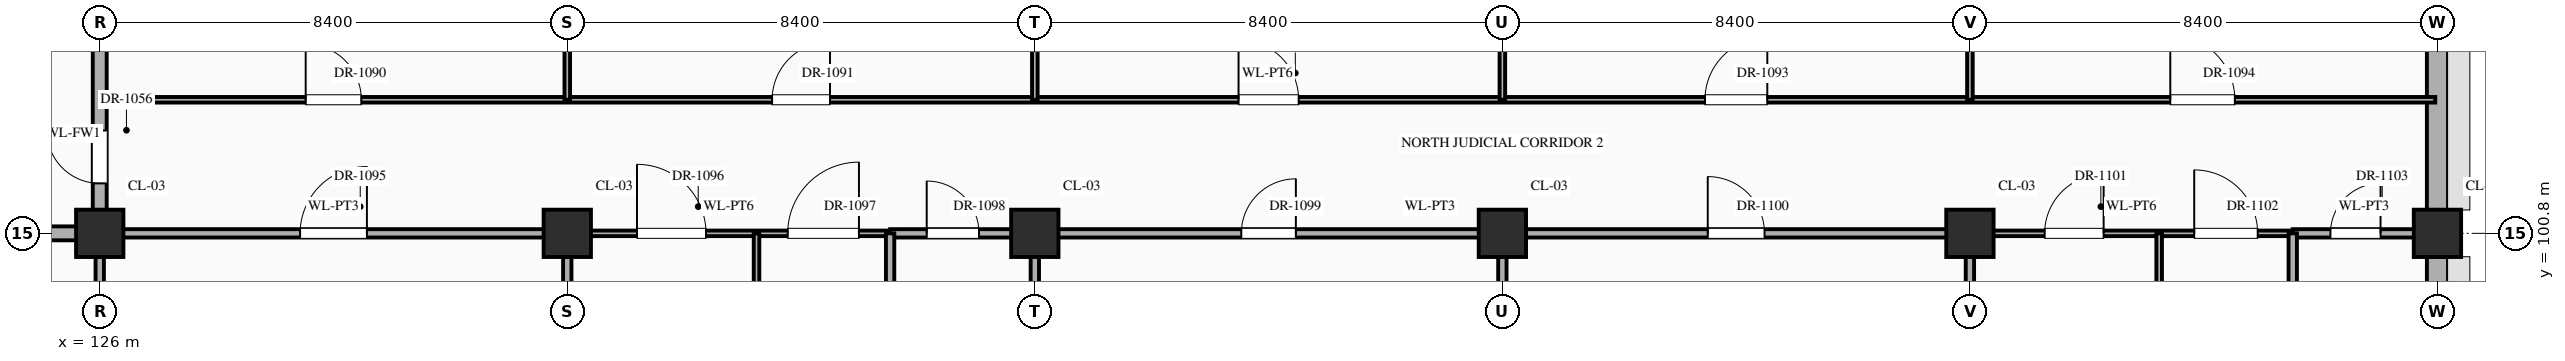
"""IFC4 building model, lengths in metres.
Left out: names, types, materials, properties, quantities, classifications, styles, units other than length and angle.
Written with IfcOpenShell. Run it as: python <this file> out.ifc"""

import sys

from ifc_helpers import new_model, si_unit, direction, frame, frame_2d, origin, origin_2d, place, context, subcontext, project, spatial, rectangle, extrude, element, fill, save


model = new_model("IFC4")
c1 = context("Model", 3, precision=1e-05, world=origin(), true_north=direction((0.0, 1.0)))
c2 = subcontext(c1, "Body", "Model", "MODEL_VIEW")
j1 = project(units=[si_unit("LENGTHUNIT", "METRE"), si_unit("PLANEANGLEUNIT", "RADIAN")], contexts=[c1])
p1 = place(None, origin())
s1 = spatial("IfcSite", under=j1, at=p1, CompositionType="ELEMENT")
p2 = place(p1, origin())
s2 = spatial("IfcBuilding", under=s1, at=p2, CompositionType="ELEMENT")
p3 = place(p2, frame((0.0, 0.0, 5.4)))
s3 = spatial("IfcBuildingStorey", under=s2, at=p3, CompositionType="ELEMENT", Elevation=5.4)
for number, where, z_axis, x_axis in (
    (1, (126.0, 100.8, 0.0), (0.0, 0.0, 1.0), (1.0, 0.0, 0.0)),
    (2, (134.4, 100.8, 0.0), (0.0, 0.0, 1.0), (1.0, 0.0, 0.0)),
    (3, (142.8, 100.8, 0.0), (0.0, 0.0, 1.0), (1.0, 0.0, 0.0)),
    (4, (151.2, 100.8, 0.0), (0.0, 0.0, 1.0), (1.0, 0.0, 0.0)),
    (5, (159.6, 100.8, 0.0), (0.0, 0.0, 1.0), (1.0, 0.0, 0.0)),
    (6, (168.0, 100.8, 0.0), (0.0, 0.0, 1.0), (1.0, 0.0, 0.0)),
):
    element("IfcColumn", number, at=place(p3, frame(where, z_axis=z_axis, x_axis=x_axis)), inside=s3, PredefinedType="COLUMN", context=c2, shape_type="SweptSolid", body=[
        extrude(rectangle(XDim=0.85, YDim=0.85, at=origin_2d()), origin(), (0.0, 0.0, 1.0), 5.4),
    ])
p4 = place(p3, frame((168.0, 94.02, 0.0), z_axis=(0.0, 0.0, 1.0), x_axis=(0.0, 1.0, 0.0)))
e7 = element("IfcWall", 7, at=p4, inside=s3, PredefinedType="STANDARD", context=c2, shape_type="SweptSolid", body=[
    extrude(rectangle(XDim=6.36, YDim=0.38, at=frame_2d((3.18, 0.0))), origin(), (0.0, 0.0, 1.0), 4.47),
])
p5 = place(p4, frame((3.88, 0.0, 0.85)))
e8 = element("IfcOpeningElement", 8, at=p5, cuts=e7, PredefinedType="OPENING", context=c2, shape_type="SweptSolid", body=[
    extrude(rectangle(XDim=1.2, YDim=1.38, at=frame_2d((0.6, 0.69))), frame((0.0, 0.202, 0.0), z_axis=(0.0, -1.0, 0.0), x_axis=(1.0, 0.0, 0.0)), (0.0, 0.0, 1.0), 0.404),
])
p6 = place(p3, frame((168.0, 101.22, 0.0), z_axis=(0.0, 0.0, 1.0), x_axis=(0.0, 1.0, 0.0)))
e9 = element("IfcWall", 9, at=p6, inside=s3, PredefinedType="STANDARD", context=c2, shape_type="SweptSolid", body=[
    extrude(rectangle(XDim=6.36, YDim=0.38, at=frame_2d((3.18, 0.0))), origin(), (0.0, 0.0, 1.0), 4.47),
])
p7 = place(p6, frame((3.88, 0.0, 0.85)))
e10 = element("IfcOpeningElement", 10, at=p7, cuts=e9, PredefinedType="OPENING", context=c2, shape_type="SweptSolid", body=[
    extrude(rectangle(XDim=1.2, YDim=1.56, at=frame_2d((0.6, 0.78))), frame((0.0, 0.202, 0.0), z_axis=(0.0, -1.0, 0.0), x_axis=(1.0, 0.0, 0.0)), (0.0, 0.0, 1.0), 0.404),
])
p8 = place(p3, frame((121.8, 100.8, 0.0), z_axis=(0.0, 0.0, 1.0), x_axis=(1.0, 0.0, 0.0)))
e11 = element("IfcWall", 11, at=p8, inside=s3, PredefinedType="STANDARD", context=c2, shape_type="SweptSolid", body=[
    extrude(rectangle(XDim=4.2, YDim=0.25, at=frame_2d((2.1, 0.0))), origin(), (0.0, 0.0, 1.0), 4.27),
])
p9 = place(p3, frame((126.0, 100.8, 0.0), z_axis=(0.0, 0.0, 1.0), x_axis=(1.0, 0.0, 0.0)))
e12 = element("IfcWall", 12, at=p9, inside=s3, PredefinedType="STANDARD", context=c2, shape_type="SweptSolid", body=[
    extrude(rectangle(XDim=8.4, YDim=0.15, at=frame_2d((4.2, 0.0))), origin(), (0.0, 0.0, 1.0), 4.27),
])
p10 = place(p9, frame((3.6, 0.0, 0.0)))
e13 = element("IfcOpeningElement", 13, at=p10, cuts=e12, PredefinedType="OPENING", context=c2, shape_type="SweptSolid", body=[
    extrude(rectangle(XDim=1.2, YDim=2.35, at=frame_2d((0.6, 1.175))), frame((0.0, 0.087, 0.0), z_axis=(0.0, -1.0, 0.0), x_axis=(1.0, 0.0, 0.0)), (0.0, 0.0, 1.0), 0.174),
])
p11 = place(p3, frame((134.4, 100.8, 0.0), z_axis=(0.0, 0.0, 1.0), x_axis=(1.0, 0.0, 0.0)))
e14 = element("IfcWall", 14, at=p11, inside=s3, PredefinedType="STANDARD", context=c2, shape_type="SweptSolid", body=[
    extrude(rectangle(XDim=5.8, YDim=0.1, at=frame_2d((2.9, 0.0))), origin(), (0.0, 0.0, 1.0), 4.27),
])
p12 = place(p11, frame((1.252, 0.0, 0.0)))
e15 = element("IfcOpeningElement", 15, at=p12, cuts=e14, PredefinedType="OPENING", context=c2, shape_type="SweptSolid", body=[
    extrude(rectangle(XDim=1.24, YDim=2.3, at=frame_2d((0.62, 1.15))), frame((0.0, 0.062, 0.0), z_axis=(0.0, -1.0, 0.0), x_axis=(1.0, 0.0, 0.0)), (0.0, 0.0, 1.0), 0.124),
])
p13 = place(p11, frame((3.96, 0.0, 0.0)))
e16 = element("IfcOpeningElement", 16, at=p13, cuts=e14, PredefinedType="OPENING", context=c2, shape_type="SweptSolid", body=[
    extrude(rectangle(XDim=1.28, YDim=2.35, at=frame_2d((0.64, 1.175))), frame((0.0, 0.062, 0.0), z_axis=(0.0, -1.0, 0.0), x_axis=(1.0, 0.0, 0.0)), (0.0, 0.0, 1.0), 0.124),
])
p14 = place(p3, frame((140.2, 100.8, 0.0), z_axis=(0.0, 0.0, 1.0), x_axis=(1.0, 0.0, 0.0)))
e17 = element("IfcWall", 17, at=p14, inside=s3, PredefinedType="STANDARD", context=c2, shape_type="SweptSolid", body=[
    extrude(rectangle(XDim=19.4, YDim=0.15, at=frame_2d((9.7, 0.0))), origin(), (0.0, 0.0, 1.0), 4.27),
])
p15 = place(p14, frame((0.657, 0.0, 0.0)))
e18 = element("IfcOpeningElement", 18, at=p15, cuts=e17, PredefinedType="OPENING", context=c2, shape_type="SweptSolid", body=[
    extrude(rectangle(XDim=0.94, YDim=2.3, at=frame_2d((0.47, 1.15))), frame((0.0, 0.087, 0.0), z_axis=(0.0, -1.0, 0.0), x_axis=(1.0, 0.0, 0.0)), (0.0, 0.0, 1.0), 0.174),
])
p16 = place(p14, frame((6.31, 0.0, 0.0)))
e19 = element("IfcOpeningElement", 19, at=p16, cuts=e17, PredefinedType="OPENING", context=c2, shape_type="SweptSolid", body=[
    extrude(rectangle(XDim=0.98, YDim=2.35, at=frame_2d((0.49, 1.175))), frame((0.0, 0.087, 0.0), z_axis=(0.0, -1.0, 0.0), x_axis=(1.0, 0.0, 0.0)), (0.0, 0.0, 1.0), 0.174),
])
p17 = place(p14, frame((14.69, 0.0, 0.0)))
e20 = element("IfcOpeningElement", 20, at=p17, cuts=e17, PredefinedType="OPENING", context=c2, shape_type="SweptSolid", body=[
    extrude(rectangle(XDim=1.02, YDim=2.4, at=frame_2d((0.51, 1.2))), frame((0.0, 0.087, 0.0), z_axis=(0.0, -1.0, 0.0), x_axis=(1.0, 0.0, 0.0)), (0.0, 0.0, 1.0), 0.174),
])
p18 = place(p3, frame((159.6, 100.8, 0.0), z_axis=(0.0, 0.0, 1.0), x_axis=(1.0, 0.0, 0.0)))
e21 = element("IfcWall", 21, at=p18, inside=s3, PredefinedType="STANDARD", context=c2, shape_type="SweptSolid", body=[
    extrude(rectangle(XDim=5.8, YDim=0.1, at=frame_2d((2.9, 0.0))), origin(), (0.0, 0.0, 1.0), 4.27),
])
p19 = place(p18, frame((1.343, 0.0, 0.0)))
e22 = element("IfcOpeningElement", 22, at=p19, cuts=e21, PredefinedType="OPENING", context=c2, shape_type="SweptSolid", body=[
    extrude(rectangle(XDim=1.06, YDim=2.4, at=frame_2d((0.53, 1.2))), frame((0.0, 0.062, 0.0), z_axis=(0.0, -1.0, 0.0), x_axis=(1.0, 0.0, 0.0)), (0.0, 0.0, 1.0), 0.124),
])
p20 = place(p18, frame((4.03, 0.0, 0.0)))
e23 = element("IfcOpeningElement", 23, at=p20, cuts=e21, PredefinedType="OPENING", context=c2, shape_type="SweptSolid", body=[
    extrude(rectangle(XDim=1.14, YDim=2.4, at=frame_2d((0.57, 1.2))), frame((0.0, 0.062, 0.0), z_axis=(0.0, -1.0, 0.0), x_axis=(1.0, 0.0, 0.0)), (0.0, 0.0, 1.0), 0.124),
])
p21 = place(p3, frame((165.4, 100.8, 0.0), z_axis=(0.0, 0.0, 1.0), x_axis=(1.0, 0.0, 0.0)))
e24 = element("IfcWall", 24, at=p21, inside=s3, PredefinedType="STANDARD", context=c2, shape_type="SweptSolid", body=[
    extrude(rectangle(XDim=2.56, YDim=0.15, at=frame_2d((1.28, 0.0))), origin(), (0.0, 0.0, 1.0), 4.27),
])
p22 = place(p21, frame((0.677, 0.0, 0.0)))
e25 = element("IfcOpeningElement", 25, at=p22, cuts=e24, PredefinedType="OPENING", context=c2, shape_type="SweptSolid", body=[
    extrude(rectangle(XDim=0.9, YDim=2.15, at=frame_2d((0.45, 1.075))), frame((0.0, 0.087, 0.0), z_axis=(0.0, -1.0, 0.0), x_axis=(1.0, 0.0, 0.0)), (0.0, 0.0, 1.0), 0.174),
])
p23 = place(p3, frame((126.0, 103.2, 0.0), z_axis=(0.0, 0.0, 1.0), x_axis=(1.0, 0.0, 0.0)))
e26 = element("IfcWall", 26, at=p23, inside=s3, PredefinedType="STANDARD", context=c2, shape_type="SweptSolid", body=[
    extrude(rectangle(XDim=41.96, YDim=0.1, at=frame_2d((20.98, 0.0))), origin(), (0.0, 0.0, 1.0), 5.12),
])
p24 = place(p23, frame((3.7, 0.0, 0.0)))
e27 = element("IfcOpeningElement", 27, at=p24, cuts=e26, PredefinedType="OPENING", context=c2, shape_type="SweptSolid", body=[
    extrude(rectangle(XDim=1.0, YDim=2.25, at=frame_2d((0.5, 1.125))), frame((0.0, 0.062, 0.0), z_axis=(0.0, -1.0, 0.0), x_axis=(1.0, 0.0, 0.0)), (0.0, 0.0, 1.0), 0.124),
])
p25 = place(p23, frame((12.08, 0.0, 0.0)))
e28 = element("IfcOpeningElement", 28, at=p25, cuts=e26, PredefinedType="OPENING", context=c2, shape_type="SweptSolid", body=[
    extrude(rectangle(XDim=1.04, YDim=2.2, at=frame_2d((0.52, 1.1))), frame((0.0, 0.062, 0.0), z_axis=(0.0, -1.0, 0.0), x_axis=(1.0, 0.0, 0.0)), (0.0, 0.0, 1.0), 0.124),
])
p26 = place(p23, frame((20.46, 0.0, 0.0)))
e29 = element("IfcOpeningElement", 29, at=p26, cuts=e26, PredefinedType="OPENING", context=c2, shape_type="SweptSolid", body=[
    extrude(rectangle(XDim=1.08, YDim=2.25, at=frame_2d((0.54, 1.125))), frame((0.0, 0.062, 0.0), z_axis=(0.0, -1.0, 0.0), x_axis=(1.0, 0.0, 0.0)), (0.0, 0.0, 1.0), 0.124),
])
p27 = place(p23, frame((28.84, 0.0, 0.0)))
e30 = element("IfcOpeningElement", 30, at=p27, cuts=e26, PredefinedType="OPENING", context=c2, shape_type="SweptSolid", body=[
    extrude(rectangle(XDim=1.12, YDim=2.25, at=frame_2d((0.56, 1.125))), frame((0.0, 0.062, 0.0), z_axis=(0.0, -1.0, 0.0), x_axis=(1.0, 0.0, 0.0)), (0.0, 0.0, 1.0), 0.124),
])
p28 = place(p23, frame((37.2, 0.0, 0.0)))
e31 = element("IfcOpeningElement", 31, at=p28, cuts=e26, PredefinedType="OPENING", context=c2, shape_type="SweptSolid", body=[
    extrude(rectangle(XDim=1.16, YDim=2.3, at=frame_2d((0.58, 1.15))), frame((0.0, 0.062, 0.0), z_axis=(0.0, -1.0, 0.0), x_axis=(1.0, 0.0, 0.0)), (0.0, 0.0, 1.0), 0.124),
])
p29 = place(p3, frame((126.0, 96.0, 0.0), z_axis=(0.0, 0.0, 1.0), x_axis=(0.0, 1.0, 0.0)))
e32 = element("IfcWall", 32, at=p29, inside=s3, PredefinedType="STANDARD", context=c2, shape_type="SweptSolid", body=[
    extrude(rectangle(XDim=4.8, YDim=0.15, at=frame_2d((2.4, 0.0))), origin(), (0.0, 0.0, 1.0), 4.37),
])
p30 = place(p3, frame((126.0, 100.8, 0.0), z_axis=(0.0, 0.0, 1.0), x_axis=(0.0, 1.0, 0.0)))
e33 = element("IfcWall", 33, at=p30, inside=s3, PredefinedType="STANDARD", context=c2, shape_type="SweptSolid", body=[
    extrude(rectangle(XDim=3.6, YDim=0.25, at=frame_2d((1.8, 0.0))), origin(), (0.0, 0.0, 1.0), 4.37),
])
p31 = place(p30, frame((0.897, 0.0, 0.0)))
e34 = element("IfcOpeningElement", 34, at=p31, cuts=e33, PredefinedType="OPENING", context=c2, shape_type="SweptSolid", body=[
    extrude(rectangle(XDim=0.95, YDim=2.15, at=frame_2d((0.475, 1.075))), frame((0.0, 0.137, 0.0), z_axis=(0.0, -1.0, 0.0), x_axis=(1.0, 0.0, 0.0)), (0.0, 0.0, 1.0), 0.274),
])
p32 = place(p3, frame((134.4, 96.0, 0.0), z_axis=(0.0, 0.0, 1.0), x_axis=(0.0, 1.0, 0.0)))
e35 = element("IfcWall", 35, at=p32, inside=s3, PredefinedType="STANDARD", context=c2, shape_type="SweptSolid", body=[
    extrude(rectangle(XDim=4.8, YDim=0.15, at=frame_2d((2.4, 0.0))), origin(), (0.0, 0.0, 1.0), 4.37),
])
p33 = place(p3, frame((134.4, 103.2, 0.0), z_axis=(0.0, 0.0, 1.0), x_axis=(0.0, 1.0, 0.0)))
e36 = element("IfcWall", 36, at=p33, inside=s3, PredefinedType="STANDARD", context=c2, shape_type="SweptSolid", body=[
    extrude(rectangle(XDim=4.76, YDim=0.1, at=frame_2d((2.38, 0.0))), origin(), (0.0, 0.0, 1.0), 4.37),
])
p34 = place(p3, frame((137.8, 96.0, 0.0), z_axis=(0.0, 0.0, 1.0), x_axis=(0.0, 1.0, 0.0)))
e37 = element("IfcWall", 37, at=p34, inside=s3, PredefinedType="STANDARD", context=c2, shape_type="SweptSolid", body=[
    extrude(rectangle(XDim=4.8, YDim=0.1, at=frame_2d((2.4, 0.0))), origin(), (0.0, 0.0, 1.0), 5.12),
])
p35 = place(p34, frame((1.94, 0.0, 0.0)))
e38 = element("IfcOpeningElement", 38, at=p35, cuts=e37, PredefinedType="OPENING", context=c2, shape_type="SweptSolid", body=[
    extrude(rectangle(XDim=0.92, YDim=2.15, at=frame_2d((0.46, 1.075))), frame((0.0, 0.062, 0.0), z_axis=(0.0, -1.0, 0.0), x_axis=(1.0, 0.0, 0.0)), (0.0, 0.0, 1.0), 0.124),
])
p36 = place(p3, frame((140.2, 96.0, 0.0), z_axis=(0.0, 0.0, 1.0), x_axis=(0.0, 1.0, 0.0)))
e39 = element("IfcWall", 39, at=p36, inside=s3, PredefinedType="STANDARD", context=c2, shape_type="SweptSolid", body=[
    extrude(rectangle(XDim=4.8, YDim=0.15, at=frame_2d((2.4, 0.0))), origin(), (0.0, 0.0, 1.0), 5.12),
])
p37 = place(p36, frame((1.92, 0.0, 0.0)))
e40 = element("IfcOpeningElement", 40, at=p37, cuts=e39, PredefinedType="OPENING", context=c2, shape_type="SweptSolid", body=[
    extrude(rectangle(XDim=0.96, YDim=2.2, at=frame_2d((0.48, 1.1))), frame((0.0, 0.087, 0.0), z_axis=(0.0, -1.0, 0.0), x_axis=(1.0, 0.0, 0.0)), (0.0, 0.0, 1.0), 0.174),
])
p38 = place(p3, frame((142.8, 96.0, 0.0), z_axis=(0.0, 0.0, 1.0), x_axis=(0.0, 1.0, 0.0)))
e41 = element("IfcWall", 41, at=p38, inside=s3, PredefinedType="STANDARD", context=c2, shape_type="SweptSolid", body=[
    extrude(rectangle(XDim=4.8, YDim=0.15, at=frame_2d((2.4, 0.0))), origin(), (0.0, 0.0, 1.0), 4.37),
])
p39 = place(p3, frame((142.8, 103.2, 0.0), z_axis=(0.0, 0.0, 1.0), x_axis=(0.0, 1.0, 0.0)))
e42 = element("IfcWall", 42, at=p39, inside=s3, PredefinedType="STANDARD", context=c2, shape_type="SweptSolid", body=[
    extrude(rectangle(XDim=4.76, YDim=0.1, at=frame_2d((2.38, 0.0))), origin(), (0.0, 0.0, 1.0), 4.37),
])
p40 = place(p3, frame((151.2, 96.0, 0.0), z_axis=(0.0, 0.0, 1.0), x_axis=(0.0, 1.0, 0.0)))
e43 = element("IfcWall", 43, at=p40, inside=s3, PredefinedType="STANDARD", context=c2, shape_type="SweptSolid", body=[
    extrude(rectangle(XDim=4.8, YDim=0.15, at=frame_2d((2.4, 0.0))), origin(), (0.0, 0.0, 1.0), 4.37),
])
p41 = place(p3, frame((151.2, 103.2, 0.0), z_axis=(0.0, 0.0, 1.0), x_axis=(0.0, 1.0, 0.0)))
e44 = element("IfcWall", 44, at=p41, inside=s3, PredefinedType="STANDARD", context=c2, shape_type="SweptSolid", body=[
    extrude(rectangle(XDim=4.76, YDim=0.1, at=frame_2d((2.38, 0.0))), origin(), (0.0, 0.0, 1.0), 4.37),
])
p42 = place(p3, frame((159.6, 96.0, 0.0), z_axis=(0.0, 0.0, 1.0), x_axis=(0.0, 1.0, 0.0)))
e45 = element("IfcWall", 45, at=p42, inside=s3, PredefinedType="STANDARD", context=c2, shape_type="SweptSolid", body=[
    extrude(rectangle(XDim=4.8, YDim=0.15, at=frame_2d((2.4, 0.0))), origin(), (0.0, 0.0, 1.0), 4.37),
])
p43 = place(p3, frame((159.6, 103.2, 0.0), z_axis=(0.0, 0.0, 1.0), x_axis=(0.0, 1.0, 0.0)))
e46 = element("IfcWall", 46, at=p43, inside=s3, PredefinedType="STANDARD", context=c2, shape_type="SweptSolid", body=[
    extrude(rectangle(XDim=4.76, YDim=0.1, at=frame_2d((2.38, 0.0))), origin(), (0.0, 0.0, 1.0), 4.37),
])
p44 = place(p3, frame((163.0, 96.0, 0.0), z_axis=(0.0, 0.0, 1.0), x_axis=(0.0, 1.0, 0.0)))
e47 = element("IfcWall", 47, at=p44, inside=s3, PredefinedType="STANDARD", context=c2, shape_type="SweptSolid", body=[
    extrude(rectangle(XDim=4.8, YDim=0.1, at=frame_2d((2.4, 0.0))), origin(), (0.0, 0.0, 1.0), 5.12),
])
p45 = place(p44, frame((1.9, 0.0, 0.0)))
e48 = element("IfcOpeningElement", 48, at=p45, cuts=e47, PredefinedType="OPENING", context=c2, shape_type="SweptSolid", body=[
    extrude(rectangle(XDim=1.0, YDim=2.25, at=frame_2d((0.5, 1.125))), frame((0.0, 0.062, 0.0), z_axis=(0.0, -1.0, 0.0), x_axis=(1.0, 0.0, 0.0)), (0.0, 0.0, 1.0), 0.124),
])
p46 = place(p3, frame((165.4, 96.0, 0.0), z_axis=(0.0, 0.0, 1.0), x_axis=(0.0, 1.0, 0.0)))
e49 = element("IfcWall", 49, at=p46, inside=s3, PredefinedType="STANDARD", context=c2, shape_type="SweptSolid", body=[
    extrude(rectangle(XDim=4.8, YDim=0.15, at=frame_2d((2.4, 0.0))), origin(), (0.0, 0.0, 1.0), 5.12),
])
p47 = place(p46, frame((1.88, 0.0, 0.0)))
e50 = element("IfcOpeningElement", 50, at=p47, cuts=e49, PredefinedType="OPENING", context=c2, shape_type="SweptSolid", body=[
    extrude(rectangle(XDim=1.04, YDim=2.2, at=frame_2d((0.52, 1.1))), frame((0.0, 0.087, 0.0), z_axis=(0.0, -1.0, 0.0), x_axis=(1.0, 0.0, 0.0)), (0.0, 0.0, 1.0), 0.174),
])
p48 = place(p31, origin())
e51 = element("IfcDoor", 51, at=p48, inside=s3, OperationType="SINGLE_SWING_RIGHT", PredefinedType="DOOR", context=c2, shape_type="SweptSolid", body=[
    extrude(rectangle(XDim=0.95, YDim=2.15, at=frame_2d((0.475, 1.075))), frame((0.0, 0.025, 0.0), z_axis=(0.0, -1.0, 0.0), x_axis=(1.0, 0.0, 0.0)), (0.0, 0.0, 1.0), 0.05),
])
fill(e34, e51)
p49 = place(p24, origin())
e52 = element("IfcDoor", 52, at=p49, inside=s3, OperationType="SINGLE_SWING_LEFT", PredefinedType="DOOR", context=c2, shape_type="SweptSolid", body=[
    extrude(rectangle(XDim=1.0, YDim=2.25, at=frame_2d((0.5, 1.125))), frame((0.0, 0.025, 0.0), z_axis=(0.0, -1.0, 0.0), x_axis=(1.0, 0.0, 0.0)), (0.0, 0.0, 1.0), 0.05),
])
fill(e27, e52)
p50 = place(p25, origin())
e53 = element("IfcDoor", 53, at=p50, inside=s3, OperationType="SINGLE_SWING_RIGHT", PredefinedType="DOOR", context=c2, shape_type="SweptSolid", body=[
    extrude(rectangle(XDim=1.04, YDim=2.2, at=frame_2d((0.52, 1.1))), frame((0.0, 0.025, 0.0), z_axis=(0.0, -1.0, 0.0), x_axis=(1.0, 0.0, 0.0)), (0.0, 0.0, 1.0), 0.05),
])
fill(e28, e53)
p51 = place(p26, origin())
e54 = element("IfcDoor", 54, at=p51, inside=s3, OperationType="SINGLE_SWING_LEFT", PredefinedType="DOOR", context=c2, shape_type="SweptSolid", body=[
    extrude(rectangle(XDim=1.08, YDim=2.25, at=frame_2d((0.54, 1.125))), frame((0.0, 0.025, 0.0), z_axis=(0.0, -1.0, 0.0), x_axis=(1.0, 0.0, 0.0)), (0.0, 0.0, 1.0), 0.05),
])
fill(e29, e54)
p52 = place(p27, origin())
e55 = element("IfcDoor", 55, at=p52, inside=s3, OperationType="SINGLE_SWING_RIGHT", PredefinedType="DOOR", context=c2, shape_type="SweptSolid", body=[
    extrude(rectangle(XDim=1.12, YDim=2.25, at=frame_2d((0.56, 1.125))), frame((0.0, 0.025, 0.0), z_axis=(0.0, -1.0, 0.0), x_axis=(1.0, 0.0, 0.0)), (0.0, 0.0, 1.0), 0.05),
])
fill(e30, e55)
p53 = place(p28, origin())
e56 = element("IfcDoor", 56, at=p53, inside=s3, OperationType="SINGLE_SWING_LEFT", PredefinedType="DOOR", context=c2, shape_type="SweptSolid", body=[
    extrude(rectangle(XDim=1.16, YDim=2.3, at=frame_2d((0.58, 1.15))), frame((0.0, 0.025, 0.0), z_axis=(0.0, -1.0, 0.0), x_axis=(1.0, 0.0, 0.0)), (0.0, 0.0, 1.0), 0.05),
])
fill(e31, e56)
p54 = place(p10, origin())
e57 = element("IfcDoor", 57, at=p54, inside=s3, OperationType="SINGLE_SWING_RIGHT", PredefinedType="DOOR", context=c2, shape_type="SweptSolid", body=[
    extrude(rectangle(XDim=1.2, YDim=2.35, at=frame_2d((0.6, 1.175))), frame((0.0, 0.025, 0.0), z_axis=(0.0, -1.0, 0.0), x_axis=(1.0, 0.0, 0.0)), (0.0, 0.0, 1.0), 0.05),
])
fill(e13, e57)
p55 = place(p12, origin())
e58 = element("IfcDoor", 58, at=p55, inside=s3, OperationType="SINGLE_SWING_LEFT", PredefinedType="DOOR", context=c2, shape_type="SweptSolid", body=[
    extrude(rectangle(XDim=1.24, YDim=2.3, at=frame_2d((0.62, 1.15))), frame((0.0, 0.025, 0.0), z_axis=(0.0, -1.0, 0.0), x_axis=(1.0, 0.0, 0.0)), (0.0, 0.0, 1.0), 0.05),
])
fill(e15, e58)
p56 = place(p13, origin())
e59 = element("IfcDoor", 59, at=p56, inside=s3, OperationType="SINGLE_SWING_RIGHT", PredefinedType="DOOR", context=c2, shape_type="SweptSolid", body=[
    extrude(rectangle(XDim=1.28, YDim=2.35, at=frame_2d((0.64, 1.175))), frame((0.0, 0.025, 0.0), z_axis=(0.0, -1.0, 0.0), x_axis=(1.0, 0.0, 0.0)), (0.0, 0.0, 1.0), 0.05),
])
fill(e16, e59)
p57 = place(p15, origin())
e60 = element("IfcDoor", 60, at=p57, inside=s3, OperationType="SINGLE_SWING_LEFT", PredefinedType="DOOR", context=c2, shape_type="SweptSolid", body=[
    extrude(rectangle(XDim=0.94, YDim=2.3, at=frame_2d((0.47, 1.15))), frame((0.0, 0.025, 0.0), z_axis=(0.0, -1.0, 0.0), x_axis=(1.0, 0.0, 0.0)), (0.0, 0.0, 1.0), 0.05),
])
fill(e18, e60)
p58 = place(p16, origin())
e61 = element("IfcDoor", 61, at=p58, inside=s3, OperationType="SINGLE_SWING_RIGHT", PredefinedType="DOOR", context=c2, shape_type="SweptSolid", body=[
    extrude(rectangle(XDim=0.98, YDim=2.35, at=frame_2d((0.49, 1.175))), frame((0.0, 0.025, 0.0), z_axis=(0.0, -1.0, 0.0), x_axis=(1.0, 0.0, 0.0)), (0.0, 0.0, 1.0), 0.05),
])
fill(e19, e61)
p59 = place(p17, origin())
e62 = element("IfcDoor", 62, at=p59, inside=s3, OperationType="SINGLE_SWING_LEFT", PredefinedType="DOOR", context=c2, shape_type="SweptSolid", body=[
    extrude(rectangle(XDim=1.02, YDim=2.4, at=frame_2d((0.51, 1.2))), frame((0.0, 0.025, 0.0), z_axis=(0.0, -1.0, 0.0), x_axis=(1.0, 0.0, 0.0)), (0.0, 0.0, 1.0), 0.05),
])
fill(e20, e62)
p60 = place(p19, origin())
e63 = element("IfcDoor", 63, at=p60, inside=s3, OperationType="SINGLE_SWING_RIGHT", PredefinedType="DOOR", context=c2, shape_type="SweptSolid", body=[
    extrude(rectangle(XDim=1.06, YDim=2.4, at=frame_2d((0.53, 1.2))), frame((0.0, 0.025, 0.0), z_axis=(0.0, -1.0, 0.0), x_axis=(1.0, 0.0, 0.0)), (0.0, 0.0, 1.0), 0.05),
])
fill(e22, e63)
p61 = place(p20, origin())
e64 = element("IfcDoor", 64, at=p61, inside=s3, OperationType="SINGLE_SWING_LEFT", PredefinedType="DOOR", context=c2, shape_type="SweptSolid", body=[
    extrude(rectangle(XDim=1.14, YDim=2.4, at=frame_2d((0.57, 1.2))), frame((0.0, 0.025, 0.0), z_axis=(0.0, -1.0, 0.0), x_axis=(1.0, 0.0, 0.0)), (0.0, 0.0, 1.0), 0.05),
])
fill(e23, e64)
p62 = place(p22, origin())
e65 = element("IfcDoor", 65, at=p62, inside=s3, OperationType="SINGLE_SWING_RIGHT", PredefinedType="DOOR", context=c2, shape_type="SweptSolid", body=[
    extrude(rectangle(XDim=0.9, YDim=2.15, at=frame_2d((0.45, 1.075))), frame((0.0, 0.025, 0.0), z_axis=(0.0, -1.0, 0.0), x_axis=(1.0, 0.0, 0.0)), (0.0, 0.0, 1.0), 0.05),
])
fill(e25, e65)
save(model, sys.argv[1])
